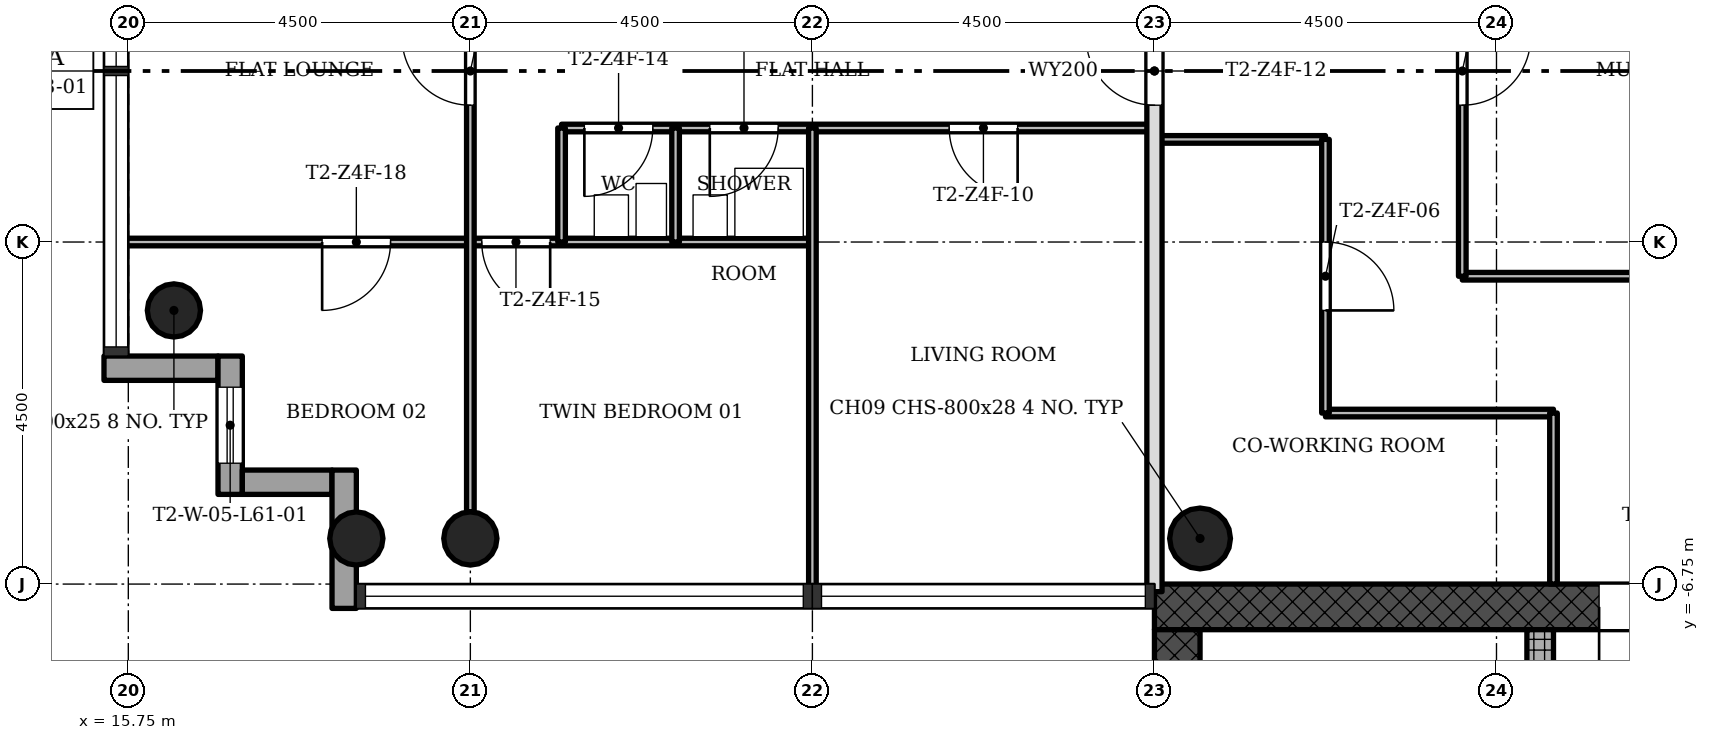
"""IFC4 building model, lengths in metres.
Left out: names, types, materials, properties, quantities, classifications, styles, units other than length and angle.
Written with IfcOpenShell. Run it as: python <this file> out.ifc"""

import sys

from ifc_helpers import new_model, si_unit, direction, frame, frame_2d, origin, origin_2d, place, context, subcontext, project, spatial, rectangle, hollow_circle, extrude, element, fill, save


model = new_model("IFC4")
c1 = context("Model", 3, precision=1e-05, world=origin(), true_north=direction((0.0, 1.0)))
c2 = subcontext(c1, "Body", "Model", "MODEL_VIEW")
j1 = project(units=[si_unit("LENGTHUNIT", "METRE"), si_unit("PLANEANGLEUNIT", "RADIAN")], contexts=[c1])
p1 = place(None, origin())
s1 = spatial("IfcSite", under=j1, at=p1, CompositionType="ELEMENT")
p2 = place(p1, origin())
s2 = spatial("IfcBuilding", under=s1, at=p2, CompositionType="ELEMENT")
p3 = place(p2, frame((0.0, 0.0, 219.8)))
s3 = spatial("IfcBuildingStorey", under=s2, at=p3, CompositionType="ELEMENT", Elevation=219.8)
p4 = place(p3, frame((42.15, -7.05, 0.0), z_axis=(0.0, 0.0, 1.0), x_axis=(-1.0, 0.0, 0.0)))
e1 = element("IfcWall", 1, at=p4, inside=s3, PredefinedType="SHEAR", context=c2, shape_type="SweptSolid", body=[
    extrude(rectangle(XDim=12.9, YDim=0.6, at=frame_2d((6.45, 0.0))), origin(), (0.0, 0.0, 1.0), 3.4),
])
p5 = place(p4, frame((5.25, 0.0, 0.0)))
e2 = element("IfcOpeningElement", 2, at=p5, cuts=e1, PredefinedType="OPENING", context=c2, shape_type="SweptSolid", body=[
    extrude(rectangle(XDim=1.8, YDim=2.1, at=frame_2d((0.9, 1.05))), frame((0.0, 0.31, 0.0), z_axis=(0.0, -1.0, 0.0), x_axis=(1.0, 0.0, 0.0)), (0.0, 0.0, 1.0), 0.62),
])
p6 = place(p3, frame((29.55, -7.35, 0.0), z_axis=(0.0, 0.0, 1.0), x_axis=(0.0, -1.0, 0.0)))
e3 = element("IfcWall", 3, at=p6, inside=s3, PredefinedType="SHEAR", context=c2, shape_type="SweptSolid", body=[
    extrude(rectangle(XDim=8.4, YDim=0.6, at=frame_2d((4.2, 0.0))), origin(), (0.0, 0.0, 1.0), 3.4),
])
p7 = place(p3, frame((34.325, -15.15, 0.0), z_axis=(0.0, 0.0, 1.0), x_axis=(0.0, 1.0, 0.0)))
e4 = element("IfcWall", 4, at=p7, inside=s3, PredefinedType="SHEAR", context=c2, shape_type="SweptSolid", body=[
    extrude(rectangle(XDim=7.8, YDim=0.35, at=frame_2d((3.9, 0.0))), origin(), (0.0, 0.0, 1.0), 3.4),
])
p8 = place(p7, frame((5.55, 0.0, 0.0)))
e5 = element("IfcOpeningElement", 5, at=p8, cuts=e4, PredefinedType="OPENING", context=c2, shape_type="SweptSolid", body=[
    extrude(rectangle(XDim=1.1, YDim=2.1, at=frame_2d((0.55, 1.05))), frame((0.0, 0.185, 0.0), z_axis=(0.0, -1.0, 0.0), x_axis=(1.0, 0.0, 0.0)), (0.0, 0.0, 1.0), 0.37),
])
p9 = place(p7, frame((1.2, 0.0, 0.0)))
e6 = element("IfcOpeningElement", 6, at=p9, cuts=e4, PredefinedType="OPENING", context=c2, shape_type="SweptSolid", body=[
    extrude(rectangle(XDim=1.1, YDim=2.1, at=frame_2d((0.55, 1.05))), frame((0.0, 0.185, 0.0), z_axis=(0.0, -1.0, 0.0), x_axis=(1.0, 0.0, 0.0)), (0.0, 0.0, 1.0), 0.37),
])
p10 = place(p7, frame((3.5, 0.0, 0.0)))
e7 = element("IfcOpeningElement", 7, at=p10, cuts=e4, PredefinedType="OPENING", context=c2, shape_type="SweptSolid", body=[
    extrude(rectangle(XDim=0.9, YDim=2.1, at=frame_2d((0.45, 1.05))), frame((0.0, 0.185, 0.0), z_axis=(0.0, -1.0, 0.0), x_axis=(1.0, 0.0, 0.0)), (0.0, 0.0, 1.0), 0.37),
])
for number, where, z_axis, x_axis in (
    (8, (20.25, -6.15, 0.0), (0.0, 0.0, 1.0), (1.0, 0.0, 0.0)),
    (9, (18.75, -6.15, 0.0), (0.0, 0.0, 1.0), (1.0, 0.0, 0.0)),
    (10, (16.35, -3.15, 0.0), (0.0, 0.0, 1.0), (1.0, 0.0, 0.0)),
):
    element("IfcColumn", number, at=place(p3, frame(where, z_axis=z_axis, x_axis=x_axis)), inside=s3, PredefinedType="COLUMN", context=c2, shape_type="SweptSolid", body=[
        extrude(hollow_circle(Radius=0.35, WallThickness=0.025, at=origin_2d()), origin(), (0.0, 0.0, 1.0), 3.4),
    ])
p11 = place(p3, frame((29.85, -6.15, 0.0), z_axis=(0.0, 0.0, 1.0), x_axis=(1.0, 0.0, 0.0)))
e11 = element("IfcColumn", 11, at=p11, inside=s3, PredefinedType="COLUMN", context=c2, shape_type="SweptSolid", body=[
    extrude(hollow_circle(Radius=0.4, WallThickness=0.028, at=origin_2d()), origin(), (0.0, 0.0, 1.0), 3.4),
])
p12 = place(p3, frame((15.43, -3.91, -0.3), z_axis=(0.0, 0.0, 1.0), x_axis=(1.0, 0.0, 0.0)))
e12 = element("IfcWall", 12, at=p12, inside=s3, PredefinedType="STANDARD", context=c2, shape_type="SweptSolid", body=[
    extrude(rectangle(XDim=1.5, YDim=0.32, at=frame_2d((0.75, 0.0))), origin(), (0.0, 0.0, 1.0), 3.4),
])
p13 = place(p3, frame((17.09, -3.75, -0.3), z_axis=(0.0, 0.0, 1.0), x_axis=(0.0, -1.0, 0.0)))
e13 = element("IfcWall", 13, at=p13, inside=s3, PredefinedType="STANDARD", context=c2, shape_type="SweptSolid", body=[
    extrude(rectangle(XDim=1.82, YDim=0.32, at=frame_2d((0.91, 0.0))), origin(), (0.0, 0.0, 1.0), 3.4),
])
p14 = place(p13, frame((0.41, 0.0, 1.2)))
e14 = element("IfcOpeningElement", 14, at=p14, cuts=e13, PredefinedType="OPENING", context=c2, shape_type="SweptSolid", body=[
    extrude(rectangle(XDim=1.0, YDim=1.5, at=frame_2d((0.5, 0.75))), frame((0.0, 0.17, 0.0), z_axis=(0.0, -1.0, 0.0), x_axis=(1.0, 0.0, 0.0)), (0.0, 0.0, 1.0), 0.34),
])
p15 = place(p3, frame((17.25, -5.41, -0.3), z_axis=(0.0, 0.0, 1.0), x_axis=(1.0, 0.0, 0.0)))
e15 = element("IfcWall", 15, at=p15, inside=s3, PredefinedType="STANDARD", context=c2, shape_type="SweptSolid", body=[
    extrude(rectangle(XDim=1.18, YDim=0.32, at=frame_2d((0.59, 0.0))), origin(), (0.0, 0.0, 1.0), 3.4),
])
p16 = place(p3, frame((18.59, -5.25, -0.3), z_axis=(0.0, 0.0, 1.0), x_axis=(0.0, -1.0, 0.0)))
e16 = element("IfcWall", 16, at=p16, inside=s3, PredefinedType="STANDARD", context=c2, shape_type="SweptSolid", body=[
    extrude(rectangle(XDim=1.82, YDim=0.32, at=frame_2d((0.91, 0.0))), origin(), (0.0, 0.0, 1.0), 3.4),
])
p17 = place(p3, frame((34.5, -4.5, 0.0), z_axis=(0.0, 0.0, 1.0), x_axis=(-1.0, 0.0, 0.0)))
e17 = element("IfcWall", 17, at=p17, inside=s3, PredefinedType="PARTITIONING", context=c2, shape_type="SweptSolid", body=[
    extrude(rectangle(XDim=3.0, YDim=0.1, at=frame_2d((1.5, 0.0))), origin(), (0.0, 0.0, 1.0), 3.0),
])
p18 = place(p3, frame((38.7, -2.7, 0.0), z_axis=(0.0, 0.0, 1.0), x_axis=(-1.0, 0.0, 0.0)))
e18 = element("IfcWall", 18, at=p18, inside=s3, PredefinedType="PARTITIONING", context=c2, shape_type="SweptSolid", body=[
    extrude(rectangle(XDim=5.4, YDim=0.1, at=frame_2d((2.7, 0.0))), origin(), (0.0, 0.0, 1.0), 3.0),
])
p19 = place(p3, frame((24.75, -2.25, 0.0), z_axis=(0.0, 0.0, 1.0), x_axis=(-1.0, 0.0, 0.0)))
e19 = element("IfcWall", 19, at=p19, inside=s3, PredefinedType="PARTITIONING", context=c2, shape_type="SweptSolid", body=[
    extrude(rectangle(XDim=9.1, YDim=0.1, at=frame_2d((4.55, 0.0))), origin(), (0.0, 0.0, 1.0), 3.0),
])
p20 = place(p19, frame((3.45, 0.0, 0.0)))
e20 = element("IfcOpeningElement", 20, at=p20, cuts=e19, PredefinedType="OPENING", context=c2, shape_type="SweptSolid", body=[
    extrude(rectangle(XDim=0.9, YDim=2.1, at=frame_2d((0.45, 1.05))), frame((0.0, 0.06, 0.0), z_axis=(0.0, -1.0, 0.0), x_axis=(1.0, 0.0, 0.0)), (0.0, 0.0, 1.0), 0.12),
])
p21 = place(p19, frame((5.55, 0.0, 0.0)))
e21 = element("IfcOpeningElement", 21, at=p21, cuts=e19, PredefinedType="OPENING", context=c2, shape_type="SweptSolid", body=[
    extrude(rectangle(XDim=0.9, YDim=2.1, at=frame_2d((0.45, 1.05))), frame((0.0, 0.06, 0.0), z_axis=(0.0, -1.0, 0.0), x_axis=(1.0, 0.0, 0.0)), (0.0, 0.0, 1.0), 0.12),
])
p22 = place(p3, frame((31.5, -0.9, 0.0), z_axis=(0.0, 0.0, 1.0), x_axis=(-1.0, 0.0, 0.0)))
e22 = element("IfcWall", 22, at=p22, inside=s3, PredefinedType="PARTITIONING", context=c2, shape_type="SweptSolid", body=[
    extrude(rectangle(XDim=2.25, YDim=0.1, at=frame_2d((1.125, 0.0))), origin(), (0.0, 0.0, 1.0), 3.0),
])
p23 = place(p3, frame((29.25, -0.75, 0.0), z_axis=(0.0, 0.0, 1.0), x_axis=(-1.0, 0.0, 0.0)))
e23 = element("IfcWall", 23, at=p23, inside=s3, PredefinedType="PARTITIONING", context=c2, shape_type="SweptSolid", body=[
    extrude(rectangle(XDim=7.8, YDim=0.1, at=frame_2d((3.9, 0.0))), origin(), (0.0, 0.0, 1.0), 3.0),
])
p24 = place(p23, frame((1.8, 0.0, 0.0)))
e24 = element("IfcOpeningElement", 24, at=p24, cuts=e23, PredefinedType="OPENING", context=c2, shape_type="SweptSolid", body=[
    extrude(rectangle(XDim=0.9, YDim=2.1, at=frame_2d((0.45, 1.05))), frame((0.0, 0.06, 0.0), z_axis=(0.0, -1.0, 0.0), x_axis=(1.0, 0.0, 0.0)), (0.0, 0.0, 1.0), 0.12),
])
p25 = place(p23, frame((4.95, 0.0, 0.0)))
e25 = element("IfcOpeningElement", 25, at=p25, cuts=e23, PredefinedType="OPENING", context=c2, shape_type="SweptSolid", body=[
    extrude(rectangle(XDim=0.9, YDim=2.1, at=frame_2d((0.45, 1.05))), frame((0.0, 0.06, 0.0), z_axis=(0.0, -1.0, 0.0), x_axis=(1.0, 0.0, 0.0)), (0.0, 0.0, 1.0), 0.12),
])
p26 = place(p23, frame((6.6, 0.0, 0.0)))
e26 = element("IfcOpeningElement", 26, at=p26, cuts=e23, PredefinedType="OPENING", context=c2, shape_type="SweptSolid", body=[
    extrude(rectangle(XDim=0.9, YDim=2.1, at=frame_2d((0.45, 1.05))), frame((0.0, 0.06, 0.0), z_axis=(0.0, -1.0, 0.0), x_axis=(1.0, 0.0, 0.0)), (0.0, 0.0, 1.0), 0.12),
])
p27 = place(p3, frame((34.5, -6.75, 0.0), z_axis=(0.0, 0.0, 1.0), x_axis=(0.0, 1.0, 0.0)))
e27 = element("IfcWall", 27, at=p27, inside=s3, PredefinedType="PARTITIONING", context=c2, shape_type="SweptSolid", body=[
    extrude(rectangle(XDim=2.25, YDim=0.1, at=frame_2d((1.125, 0.0))), origin(), (0.0, 0.0, 1.0), 3.0),
])
p28 = place(p3, frame((33.3, -2.7, 0.0), z_axis=(0.0, 0.0, 1.0), x_axis=(0.0, 1.0, 0.0)))
e28 = element("IfcWall", 28, at=p28, inside=s3, PredefinedType="PARTITIONING", context=c2, shape_type="SweptSolid", body=[
    extrude(rectangle(XDim=5.4, YDim=0.1, at=frame_2d((2.7, 0.0))), origin(), (0.0, 0.0, 1.0), 3.0),
])
p29 = place(p28, frame((2.25, 0.0, 0.0)))
e29 = element("IfcOpeningElement", 29, at=p29, cuts=e28, PredefinedType="OPENING", context=c2, shape_type="SweptSolid", body=[
    extrude(rectangle(XDim=0.9, YDim=2.1, at=frame_2d((0.45, 1.05))), frame((0.0, 0.06, 0.0), z_axis=(0.0, -1.0, 0.0), x_axis=(1.0, 0.0, 0.0)), (0.0, 0.0, 1.0), 0.12),
])
p30 = place(p3, frame((31.5, -4.5, 0.0), z_axis=(0.0, 0.0, 1.0), x_axis=(0.0, 1.0, 0.0)))
e30 = element("IfcWall", 30, at=p30, inside=s3, PredefinedType="PARTITIONING", context=c2, shape_type="SweptSolid", body=[
    extrude(rectangle(XDim=3.6, YDim=0.1, at=frame_2d((1.8, 0.0))), origin(), (0.0, 0.0, 1.0), 3.0),
])
p31 = place(p30, frame((1.35, 0.0, 0.0)))
e31 = element("IfcOpeningElement", 31, at=p31, cuts=e30, PredefinedType="OPENING", context=c2, shape_type="SweptSolid", body=[
    extrude(rectangle(XDim=0.9, YDim=2.1, at=frame_2d((0.45, 1.05))), frame((0.0, 0.06, 0.0), z_axis=(0.0, -1.0, 0.0), x_axis=(1.0, 0.0, 0.0)), (0.0, 0.0, 1.0), 0.12),
])
p32 = place(p3, frame((29.25, -6.85, 0.0), z_axis=(0.0, 0.0, 1.0), x_axis=(0.0, 1.0, 0.0)))
e32 = element("IfcWall", 32, at=p32, inside=s3, PredefinedType="SOLIDWALL", context=c2, shape_type="SweptSolid", body=[
    extrude(rectangle(XDim=13.7, YDim=0.2, at=frame_2d((6.85, 0.0))), origin(), (0.0, 0.0, 1.0), 3.0),
])
p33 = place(p32, frame((6.4, 0.0, 0.0)))
e33 = element("IfcOpeningElement", 33, at=p33, cuts=e32, PredefinedType="OPENING", context=c2, shape_type="SweptSolid", body=[
    extrude(rectangle(XDim=0.9, YDim=2.1, at=frame_2d((0.45, 1.05))), frame((0.0, 0.11, 0.0), z_axis=(0.0, -1.0, 0.0), x_axis=(1.0, 0.0, 0.0)), (0.0, 0.0, 1.0), 0.22),
])
p34 = place(p3, frame((24.75, -6.85, 0.0), z_axis=(0.0, 0.0, 1.0), x_axis=(0.0, 1.0, 0.0)))
e34 = element("IfcWall", 34, at=p34, inside=s3, PredefinedType="PARTITIONING", context=c2, shape_type="SweptSolid", body=[
    extrude(rectangle(XDim=6.1, YDim=0.1, at=frame_2d((3.05, 0.0))), origin(), (0.0, 0.0, 1.0), 3.0),
])
for number, where, z_axis, x_axis in (
    (35, (22.95, -2.25, 0.0), (0.0, 0.0, 1.0), (0.0, 1.0, 0.0)),
    (36, (21.45, -2.25, 0.0), (0.0, 0.0, 1.0), (0.0, 1.0, 0.0)),
):
    element("IfcWall", number, at=place(p3, frame(where, z_axis=z_axis, x_axis=x_axis)), inside=s3, PredefinedType="PARTITIONING", context=c2, shape_type="SweptSolid", body=[
        extrude(rectangle(XDim=1.5, YDim=0.1, at=frame_2d((0.75, 0.0))), origin(), (0.0, 0.0, 1.0), 3.0),
    ])
p35 = place(p3, frame((20.25, -5.8, 0.0), z_axis=(0.0, 0.0, 1.0), x_axis=(0.0, 1.0, 0.0)))
e37 = element("IfcWall", 37, at=p35, inside=s3, PredefinedType="PARTITIONING", context=c2, shape_type="SweptSolid", body=[
    extrude(rectangle(XDim=11.6, YDim=0.1, at=frame_2d((5.8, 0.0))), origin(), (0.0, 0.0, 1.0), 3.0),
])
p36 = place(p35, frame((5.35, 0.0, 0.0)))
e38 = element("IfcOpeningElement", 38, at=p36, cuts=e37, PredefinedType="OPENING", context=c2, shape_type="SweptSolid", body=[
    extrude(rectangle(XDim=0.9, YDim=2.1, at=frame_2d((0.45, 1.05))), frame((0.0, 0.06, 0.0), z_axis=(0.0, -1.0, 0.0), x_axis=(1.0, 0.0, 0.0)), (0.0, 0.0, 1.0), 0.12),
])
p37 = place(p29, origin())
e39 = element("IfcDoor", 39, at=p37, inside=s3, OperationType="SINGLE_SWING_RIGHT", PredefinedType="DOOR", context=c2, shape_type="SweptSolid", body=[
    extrude(rectangle(XDim=0.9, YDim=2.1, at=frame_2d((0.45, 1.05))), frame((0.0, 0.025, 0.0), z_axis=(0.0, -1.0, 0.0), x_axis=(1.0, 0.0, 0.0)), (0.0, 0.0, 1.0), 0.05),
])
fill(e29, e39)
p38 = place(p31, origin())
e40 = element("IfcDoor", 40, at=p38, inside=s3, OperationType="SINGLE_SWING_LEFT", PredefinedType="DOOR", context=c2, shape_type="SweptSolid", body=[
    extrude(rectangle(XDim=0.9, YDim=2.1, at=frame_2d((0.45, 1.05))), frame((0.0, 0.025, 0.0), z_axis=(0.0, -1.0, 0.0), x_axis=(1.0, 0.0, 0.0)), (0.0, 0.0, 1.0), 0.05),
])
fill(e31, e40)
p39 = place(p24, origin())
e41 = element("IfcDoor", 41, at=p39, inside=s3, OperationType="SINGLE_SWING_RIGHT", PredefinedType="DOOR", context=c2, shape_type="SweptSolid", body=[
    extrude(rectangle(XDim=0.9, YDim=2.1, at=frame_2d((0.45, 1.05))), frame((0.0, 0.025, 0.0), z_axis=(0.0, -1.0, 0.0), x_axis=(1.0, 0.0, 0.0)), (0.0, 0.0, 1.0), 0.05),
])
fill(e24, e41)
p40 = place(p33, origin())
e42 = element("IfcDoor", 42, at=p40, inside=s3, OperationType="SINGLE_SWING_LEFT", PredefinedType="DOOR", context=c2, shape_type="SweptSolid", body=[
    extrude(rectangle(XDim=0.9, YDim=2.1, at=frame_2d((0.45, 1.05))), frame((0.0, 0.025, 0.0), z_axis=(0.0, -1.0, 0.0), x_axis=(1.0, 0.0, 0.0)), (0.0, 0.0, 1.0), 0.05),
])
fill(e33, e42)
p41 = place(p25, origin())
e43 = element("IfcDoor", 43, at=p41, inside=s3, OperationType="SINGLE_SWING_LEFT", PredefinedType="DOOR", context=c2, shape_type="SweptSolid", body=[
    extrude(rectangle(XDim=0.9, YDim=2.1, at=frame_2d((0.45, 1.05))), frame((0.0, 0.025, 0.0), z_axis=(0.0, -1.0, 0.0), x_axis=(1.0, 0.0, 0.0)), (0.0, 0.0, 1.0), 0.05),
])
fill(e25, e43)
p42 = place(p26, origin())
e44 = element("IfcDoor", 44, at=p42, inside=s3, OperationType="SINGLE_SWING_LEFT", PredefinedType="DOOR", context=c2, shape_type="SweptSolid", body=[
    extrude(rectangle(XDim=0.9, YDim=2.1, at=frame_2d((0.45, 1.05))), frame((0.0, 0.025, 0.0), z_axis=(0.0, -1.0, 0.0), x_axis=(1.0, 0.0, 0.0)), (0.0, 0.0, 1.0), 0.05),
])
fill(e26, e44)
p43 = place(p20, origin())
e45 = element("IfcDoor", 45, at=p43, inside=s3, OperationType="SINGLE_SWING_RIGHT", PredefinedType="DOOR", context=c2, shape_type="SweptSolid", body=[
    extrude(rectangle(XDim=0.9, YDim=2.1, at=frame_2d((0.45, 1.05))), frame((0.0, 0.025, 0.0), z_axis=(0.0, -1.0, 0.0), x_axis=(1.0, 0.0, 0.0)), (0.0, 0.0, 1.0), 0.05),
])
fill(e20, e45)
p44 = place(p36, origin())
e46 = element("IfcDoor", 46, at=p44, inside=s3, OperationType="SINGLE_SWING_LEFT", PredefinedType="DOOR", context=c2, shape_type="SweptSolid", body=[
    extrude(rectangle(XDim=0.9, YDim=2.1, at=frame_2d((0.45, 1.05))), frame((0.0, 0.025, 0.0), z_axis=(0.0, -1.0, 0.0), x_axis=(1.0, 0.0, 0.0)), (0.0, 0.0, 1.0), 0.05),
])
fill(e38, e46)
p45 = place(p21, origin())
e47 = element("IfcDoor", 47, at=p45, inside=s3, OperationType="SINGLE_SWING_LEFT", PredefinedType="DOOR", context=c2, shape_type="SweptSolid", body=[
    extrude(rectangle(XDim=0.9, YDim=2.1, at=frame_2d((0.45, 1.05))), frame((0.0, 0.025, 0.0), z_axis=(0.0, -1.0, 0.0), x_axis=(1.0, 0.0, 0.0)), (0.0, 0.0, 1.0), 0.05),
])
fill(e21, e47)
p46 = place(p5, origin())
e48 = element("IfcDoor", 48, at=p46, inside=s3, OperationType="SINGLE_SWING_LEFT", PredefinedType="DOOR", context=c2, shape_type="SweptSolid", body=[
    extrude(rectangle(XDim=1.8, YDim=2.1, at=frame_2d((0.9, 1.05))), frame((0.0, 0.025, 0.0), z_axis=(0.0, -1.0, 0.0), x_axis=(1.0, 0.0, 0.0)), (0.0, 0.0, 1.0), 0.05),
])
fill(e2, e48)
p47 = place(p14, origin())
e49 = element("IfcWindow", 49, at=p47, inside=s3, PartitioningType="SINGLE_PANEL", PredefinedType="WINDOW", context=c2, shape_type="SweptSolid", body=[
    extrude(rectangle(XDim=1.0, YDim=1.5, at=frame_2d((0.5, 0.75))), frame((0.0, 0.03, 0.0), z_axis=(0.0, -1.0, 0.0), x_axis=(1.0, 0.0, 0.0)), (0.0, 0.0, 1.0), 0.06),
])
fill(e14, e49)
save(model, sys.argv[1])
